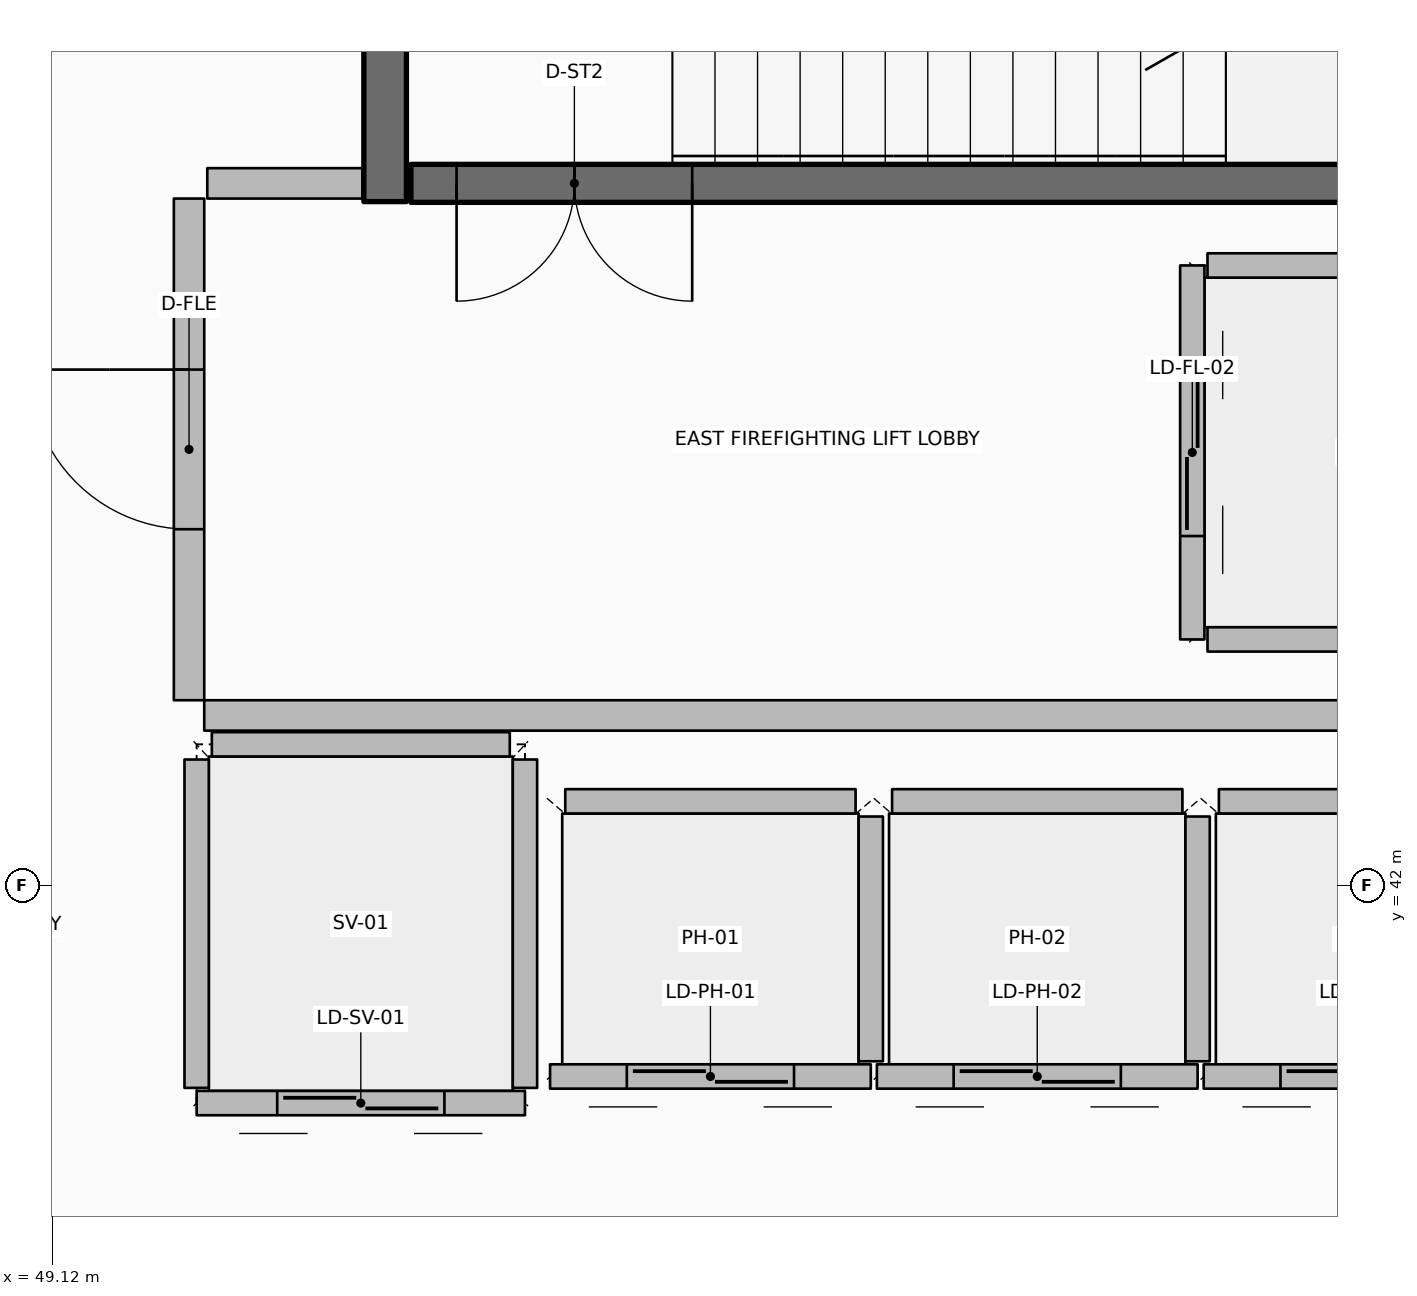
"""IFC4 building model, lengths in metres.
Left out: names, types, materials, properties, quantities, classifications, styles, units other than length and angle.
Written with IfcOpenShell. Run it as: python <this file> out.ifc"""

import sys

from ifc_helpers import new_model, si_unit, direction, frame, frame_2d, origin, origin_2d, place, context, subcontext, project, spatial, rectangle, hollow_rectangle, extrude, element, fill, save


model = new_model("IFC4")
c1 = context("Model", 3, precision=1e-05, world=origin(), true_north=direction((0.0, 1.0)))
c2 = subcontext(c1, "Body", "Model", "MODEL_VIEW")
j1 = project(units=[si_unit("LENGTHUNIT", "METRE"), si_unit("PLANEANGLEUNIT", "RADIAN")], contexts=[c1])
p1 = place(None, origin())
s1 = spatial("IfcSite", under=j1, at=p1, CompositionType="ELEMENT")
p2 = place(p1, origin())
s2 = spatial("IfcBuilding", under=s1, at=p2, CompositionType="ELEMENT")
p3 = place(p2, frame((0.0, 0.0, 231.9)))
s3 = spatial("IfcBuildingStorey", under=s2, at=p3, CompositionType="ELEMENT", Elevation=231.9)
p4 = place(p3, frame((51.31, 46.5, 0.0), z_axis=(0.0, 0.0, 1.0), x_axis=(0.0, 1.0, 0.0)))
e1 = element("IfcWall", 1, at=p4, inside=s3, PredefinedType="SHEAR", context=c2, shape_type="SweptSolid", body=[
    extrude(rectangle(XDim=3.5, YDim=0.28, at=frame_2d((1.75, 0.0))), origin(), (0.0, 0.0, 1.0), 4.8),
])
p5 = place(p3, frame((56.84, 46.62, 0.0), z_axis=(0.0, 0.0, 1.0), x_axis=(1.0, 0.0, 0.0)))
e2 = element("IfcColumn", 2, at=p5, inside=s3, PredefinedType="COLUMN", context=c2, shape_type="SweptSolid", body=[
    extrude(hollow_rectangle(XDim=0.2, YDim=0.2, WallThickness=0.01, InnerFilletRadius=0.01, OuterFilletRadius=0.02, at=origin_2d()), origin(), (0.0, 0.0, 1.0), 2.195),
])
p6 = place(p3, frame((51.48, 46.62, 0.0), z_axis=(0.0, 0.0, 1.0), x_axis=(1.0, 0.0, 0.0)))
e3 = element("IfcWall", 3, at=p6, inside=s3, PredefinedType="SOLIDWALL", context=c2, shape_type="SweptSolid", body=[
    extrude(rectangle(XDim=7.54, YDim=0.25, at=frame_2d((3.77, 0.0))), origin(), (0.0, 0.0, 1.0), 4.4),
])
p7 = place(p6, frame((0.3, 0.0, 0.0)))
e4 = element("IfcOpeningElement", 4, at=p7, cuts=e3, PredefinedType="OPENING", context=c2, shape_type="SweptSolid", body=[
    extrude(rectangle(XDim=1.55, YDim=2.15, at=frame_2d((0.775, 1.075))), frame((0.0, 0.135, 0.0), z_axis=(0.0, -1.0, 0.0), x_axis=(1.0, 0.0, 0.0)), (0.0, 0.0, 1.0), 0.27),
])
p8 = place(p3, frame((54.505, 40.745, 0.0), z_axis=(0.0, 0.0, 1.0), x_axis=(-1.0, 0.0, 0.0)))
e5 = element("IfcWall", 5, at=p8, inside=s3, PredefinedType="PARTITIONING", context=c2, shape_type="SweptSolid", body=[
    extrude(rectangle(XDim=2.11, YDim=0.16, at=frame_2d((1.055, 0.0))), origin(), (0.0, 0.0, 1.0), 4.4),
])
p9 = place(p8, frame((0.505, 0.0, 0.0)))
e6 = element("IfcOpeningElement", 6, at=p9, cuts=e5, PredefinedType="OPENING", context=c2, shape_type="SweptSolid", body=[
    extrude(rectangle(XDim=1.1, YDim=2.1, at=frame_2d((0.55, 1.05))), frame((0.0, 0.09, 0.0), z_axis=(0.0, -1.0, 0.0), x_axis=(1.0, 0.0, 0.0)), (0.0, 0.0, 1.0), 0.18),
])
p10 = place(p3, frame((54.505, 40.845, 0.0), z_axis=(0.0, 0.0, 1.0), x_axis=(0.0, 1.0, 0.0)))
e7 = element("IfcWall", 7, at=p10, inside=s3, PredefinedType="PARTITIONING", context=c2, shape_type="SweptSolid", body=[
    extrude(rectangle(XDim=1.61, YDim=0.16, at=frame_2d((0.805, 0.0))), origin(), (0.0, 0.0, 1.0), 4.4),
])
p11 = place(p3, frame((52.495, 42.555, 0.0), z_axis=(0.0, 0.0, 1.0), x_axis=(1.0, 0.0, 0.0)))
e8 = element("IfcWall", 8, at=p11, inside=s3, PredefinedType="PARTITIONING", context=c2, shape_type="SweptSolid", body=[
    extrude(rectangle(XDim=1.91, YDim=0.16, at=frame_2d((0.955, 0.0))), origin(), (0.0, 0.0, 1.0), 4.4),
])
p12 = place(p3, frame((56.655, 40.745, 0.0), z_axis=(0.0, 0.0, 1.0), x_axis=(-1.0, 0.0, 0.0)))
e9 = element("IfcWall", 9, at=p12, inside=s3, PredefinedType="PARTITIONING", context=c2, shape_type="SweptSolid", body=[
    extrude(rectangle(XDim=2.11, YDim=0.16, at=frame_2d((1.055, 0.0))), origin(), (0.0, 0.0, 1.0), 4.4),
])
p13 = place(p12, frame((0.505, 0.0, 0.0)))
e10 = element("IfcOpeningElement", 10, at=p13, cuts=e9, PredefinedType="OPENING", context=c2, shape_type="SweptSolid", body=[
    extrude(rectangle(XDim=1.1, YDim=2.1, at=frame_2d((0.55, 1.05))), frame((0.0, 0.09, 0.0), z_axis=(0.0, -1.0, 0.0), x_axis=(1.0, 0.0, 0.0)), (0.0, 0.0, 1.0), 0.18),
])
p14 = place(p3, frame((56.655, 40.845, 0.0), z_axis=(0.0, 0.0, 1.0), x_axis=(0.0, 1.0, 0.0)))
e11 = element("IfcWall", 11, at=p14, inside=s3, PredefinedType="PARTITIONING", context=c2, shape_type="SweptSolid", body=[
    extrude(rectangle(XDim=1.61, YDim=0.16, at=frame_2d((0.805, 0.0))), origin(), (0.0, 0.0, 1.0), 4.4),
])
p15 = place(p3, frame((54.645, 42.555, 0.0), z_axis=(0.0, 0.0, 1.0), x_axis=(1.0, 0.0, 0.0)))
e12 = element("IfcWall", 12, at=p15, inside=s3, PredefinedType="PARTITIONING", context=c2, shape_type="SweptSolid", body=[
    extrude(rectangle(XDim=1.91, YDim=0.16, at=frame_2d((0.955, 0.0))), origin(), (0.0, 0.0, 1.0), 4.4),
])
p16 = place(p3, frame((58.805, 40.745, 0.0), z_axis=(0.0, 0.0, 1.0), x_axis=(-1.0, 0.0, 0.0)))
e13 = element("IfcWall", 13, at=p16, inside=s3, PredefinedType="PARTITIONING", context=c2, shape_type="SweptSolid", body=[
    extrude(rectangle(XDim=2.11, YDim=0.16, at=frame_2d((1.055, 0.0))), origin(), (0.0, 0.0, 1.0), 4.4),
])
p17 = place(p16, frame((0.505, 0.0, 0.0)))
e14 = element("IfcOpeningElement", 14, at=p17, cuts=e13, PredefinedType="OPENING", context=c2, shape_type="SweptSolid", body=[
    extrude(rectangle(XDim=1.1, YDim=2.1, at=frame_2d((0.55, 1.05))), frame((0.0, 0.09, 0.0), z_axis=(0.0, -1.0, 0.0), x_axis=(1.0, 0.0, 0.0)), (0.0, 0.0, 1.0), 0.18),
])
p18 = place(p3, frame((56.795, 42.555, 0.0), z_axis=(0.0, 0.0, 1.0), x_axis=(1.0, 0.0, 0.0)))
e15 = element("IfcWall", 15, at=p18, inside=s3, PredefinedType="PARTITIONING", context=c2, shape_type="SweptSolid", body=[
    extrude(rectangle(XDim=1.91, YDim=0.16, at=frame_2d((0.955, 0.0))), origin(), (0.0, 0.0, 1.0), 4.4),
])
p19 = place(p3, frame((56.62, 46.08, 0.0), z_axis=(0.0, 0.0, 1.0), x_axis=(0.0, -1.0, 0.0)))
e16 = element("IfcWall", 16, at=p19, inside=s3, PredefinedType="PARTITIONING", context=c2, shape_type="SweptSolid", body=[
    extrude(rectangle(XDim=2.46, YDim=0.16, at=frame_2d((1.23, 0.0))), origin(), (0.0, 0.0, 1.0), 4.4),
])
p20 = place(p19, frame((0.68, 0.0, 0.0)))
e17 = element("IfcOpeningElement", 17, at=p20, cuts=e16, PredefinedType="OPENING", context=c2, shape_type="SweptSolid", body=[
    extrude(rectangle(XDim=1.1, YDim=2.1, at=frame_2d((0.55, 1.05))), frame((0.0, 0.09, 0.0), z_axis=(0.0, -1.0, 0.0), x_axis=(1.0, 0.0, 0.0)), (0.0, 0.0, 1.0), 0.18),
])
for number, where, z_axis, x_axis in (
    (18, (56.72, 46.08, 0.0), (0.0, 0.0, 1.0), (1.0, 0.0, 0.0)),
    (19, (56.72, 43.62, 0.0), (0.0, 0.0, 1.0), (1.0, 0.0, 0.0)),
):
    element("IfcWall", number, at=place(p3, frame(where, z_axis=z_axis, x_axis=x_axis)), inside=s3, PredefinedType="PARTITIONING", context=c2, shape_type="SweptSolid", body=[
        extrude(rectangle(XDim=2.06, YDim=0.16, at=frame_2d((1.03, 0.0))), origin(), (0.0, 0.0, 1.0), 4.4),
    ])
p21 = place(p3, frame((52.23, 40.57, 0.0), z_axis=(0.0, 0.0, 1.0), x_axis=(-1.0, 0.0, 0.0)))
e20 = element("IfcWall", 20, at=p21, inside=s3, PredefinedType="PARTITIONING", context=c2, shape_type="SweptSolid", body=[
    extrude(rectangle(XDim=2.16, YDim=0.16, at=frame_2d((1.08, 0.0))), origin(), (0.0, 0.0, 1.0), 4.4),
])
p22 = place(p21, frame((0.53, 0.0, 0.0)))
e21 = element("IfcOpeningElement", 21, at=p22, cuts=e20, PredefinedType="OPENING", context=c2, shape_type="SweptSolid", body=[
    extrude(rectangle(XDim=1.1, YDim=2.1, at=frame_2d((0.55, 1.05))), frame((0.0, 0.09, 0.0), z_axis=(0.0, -1.0, 0.0), x_axis=(1.0, 0.0, 0.0)), (0.0, 0.0, 1.0), 0.18),
])
for number, where, z_axis, x_axis in (
    (22, (52.23, 40.67, 0.0), (0.0, 0.0, 1.0), (0.0, 1.0, 0.0)),
    (23, (50.07, 40.67, 0.0), (0.0, 0.0, 1.0), (0.0, 1.0, 0.0)),
):
    element("IfcWall", number, at=place(p3, frame(where, z_axis=z_axis, x_axis=x_axis)), inside=s3, PredefinedType="PARTITIONING", context=c2, shape_type="SweptSolid", body=[
        extrude(rectangle(XDim=2.16, YDim=0.16, at=frame_2d((1.08, 0.0))), origin(), (0.0, 0.0, 1.0), 4.4),
    ])
p23 = place(p3, frame((50.17, 42.93, 0.0), z_axis=(0.0, 0.0, 1.0), x_axis=(1.0, 0.0, 0.0)))
e24 = element("IfcWall", 24, at=p23, inside=s3, PredefinedType="PARTITIONING", context=c2, shape_type="SweptSolid", body=[
    extrude(rectangle(XDim=1.96, YDim=0.16, at=frame_2d((0.98, 0.0))), origin(), (0.0, 0.0, 1.0), 4.4),
])
p24 = place(p3, frame((50.12, 43.12, 0.0), z_axis=(0.0, 0.0, 1.0), x_axis=(1.0, 0.0, 0.0)))
e25 = element("IfcWall", 25, at=p24, inside=s3, PredefinedType="PARTITIONING", context=c2, shape_type="SweptSolid", body=[
    extrude(rectangle(XDim=8.88, YDim=0.2, at=frame_2d((4.44, 0.0))), origin(), (0.0, 0.0, 1.0), 4.4),
])
p25 = place(p3, frame((50.14, 46.62, 0.0), z_axis=(0.0, 0.0, 1.0), x_axis=(1.0, 0.0, 0.0)))
e26 = element("IfcWall", 26, at=p25, inside=s3, PredefinedType="PARTITIONING", context=c2, shape_type="SweptSolid", body=[
    extrude(rectangle(XDim=1.02, YDim=0.2, at=frame_2d((0.51, 0.0))), origin(), (0.0, 0.0, 1.0), 4.4),
])
p26 = place(p3, frame((50.02, 43.22, 0.0), z_axis=(0.0, 0.0, 1.0), x_axis=(0.0, 1.0, 0.0)))
e27 = element("IfcWall", 27, at=p26, inside=s3, PredefinedType="PARTITIONING", context=c2, shape_type="SweptSolid", body=[
    extrude(rectangle(XDim=3.3, YDim=0.2, at=frame_2d((1.65, 0.0))), origin(), (0.0, 0.0, 1.0), 4.4),
])
p27 = place(p26, frame((1.125, 0.0, 0.0)))
e28 = element("IfcOpeningElement", 28, at=p27, cuts=e27, PredefinedType="OPENING", context=c2, shape_type="SweptSolid", body=[
    extrude(rectangle(XDim=1.05, YDim=2.1, at=frame_2d((0.525, 1.05))), frame((0.0, 0.11, 0.0), z_axis=(0.0, -1.0, 0.0), x_axis=(1.0, 0.0, 0.0)), (0.0, 0.0, 1.0), 0.22),
])
p28 = place(p7, origin())
e29 = element("IfcDoor", 29, at=p28, inside=s3, OperationType="DOUBLE_DOOR_SINGLE_SWING", PredefinedType="DOOR", context=c2, shape_type="SweptSolid", body=[
    extrude(rectangle(XDim=1.55, YDim=2.15, at=frame_2d((0.775, 1.075))), frame((0.0, 0.025, 0.0), z_axis=(0.0, -1.0, 0.0), x_axis=(1.0, 0.0, 0.0)), (0.0, 0.0, 1.0), 0.05),
])
fill(e4, e29)
p29 = place(p9, origin())
e30 = element("IfcDoor", 30, at=p29, inside=s3, OperationType="DOUBLE_DOOR_SLIDING", PredefinedType="DOOR", context=c2, shape_type="SweptSolid", body=[
    extrude(rectangle(XDim=1.1, YDim=2.1, at=frame_2d((0.55, 1.05))), frame((0.0, 0.025, 0.0), z_axis=(0.0, -1.0, 0.0), x_axis=(1.0, 0.0, 0.0)), (0.0, 0.0, 1.0), 0.05),
])
fill(e6, e30)
p30 = place(p13, origin())
e31 = element("IfcDoor", 31, at=p30, inside=s3, OperationType="DOUBLE_DOOR_SLIDING", PredefinedType="DOOR", context=c2, shape_type="SweptSolid", body=[
    extrude(rectangle(XDim=1.1, YDim=2.1, at=frame_2d((0.55, 1.05))), frame((0.0, 0.025, 0.0), z_axis=(0.0, -1.0, 0.0), x_axis=(1.0, 0.0, 0.0)), (0.0, 0.0, 1.0), 0.05),
])
fill(e10, e31)
p31 = place(p17, origin())
e32 = element("IfcDoor", 32, at=p31, inside=s3, OperationType="DOUBLE_DOOR_SLIDING", PredefinedType="DOOR", context=c2, shape_type="SweptSolid", body=[
    extrude(rectangle(XDim=1.1, YDim=2.1, at=frame_2d((0.55, 1.05))), frame((0.0, 0.025, 0.0), z_axis=(0.0, -1.0, 0.0), x_axis=(1.0, 0.0, 0.0)), (0.0, 0.0, 1.0), 0.05),
])
fill(e14, e32)
p32 = place(p20, origin())
e33 = element("IfcDoor", 33, at=p32, inside=s3, OperationType="DOUBLE_DOOR_SLIDING", PredefinedType="DOOR", context=c2, shape_type="SweptSolid", body=[
    extrude(rectangle(XDim=1.1, YDim=2.1, at=frame_2d((0.55, 1.05))), frame((0.0, 0.025, 0.0), z_axis=(0.0, -1.0, 0.0), x_axis=(1.0, 0.0, 0.0)), (0.0, 0.0, 1.0), 0.05),
])
fill(e17, e33)
p33 = place(p22, origin())
e34 = element("IfcDoor", 34, at=p33, inside=s3, OperationType="DOUBLE_DOOR_SLIDING", PredefinedType="DOOR", context=c2, shape_type="SweptSolid", body=[
    extrude(rectangle(XDim=1.1, YDim=2.1, at=frame_2d((0.55, 1.05))), frame((0.0, 0.025, 0.0), z_axis=(0.0, -1.0, 0.0), x_axis=(1.0, 0.0, 0.0)), (0.0, 0.0, 1.0), 0.05),
])
fill(e21, e34)
p34 = place(p27, origin())
e35 = element("IfcDoor", 35, at=p34, inside=s3, OperationType="SINGLE_SWING_RIGHT", PredefinedType="DOOR", context=c2, shape_type="SweptSolid", body=[
    extrude(rectangle(XDim=1.05, YDim=2.1, at=frame_2d((0.525, 1.05))), frame((0.0, 0.025, 0.0), z_axis=(0.0, -1.0, 0.0), x_axis=(1.0, 0.0, 0.0)), (0.0, 0.0, 1.0), 0.05),
])
fill(e28, e35)
save(model, sys.argv[1])
